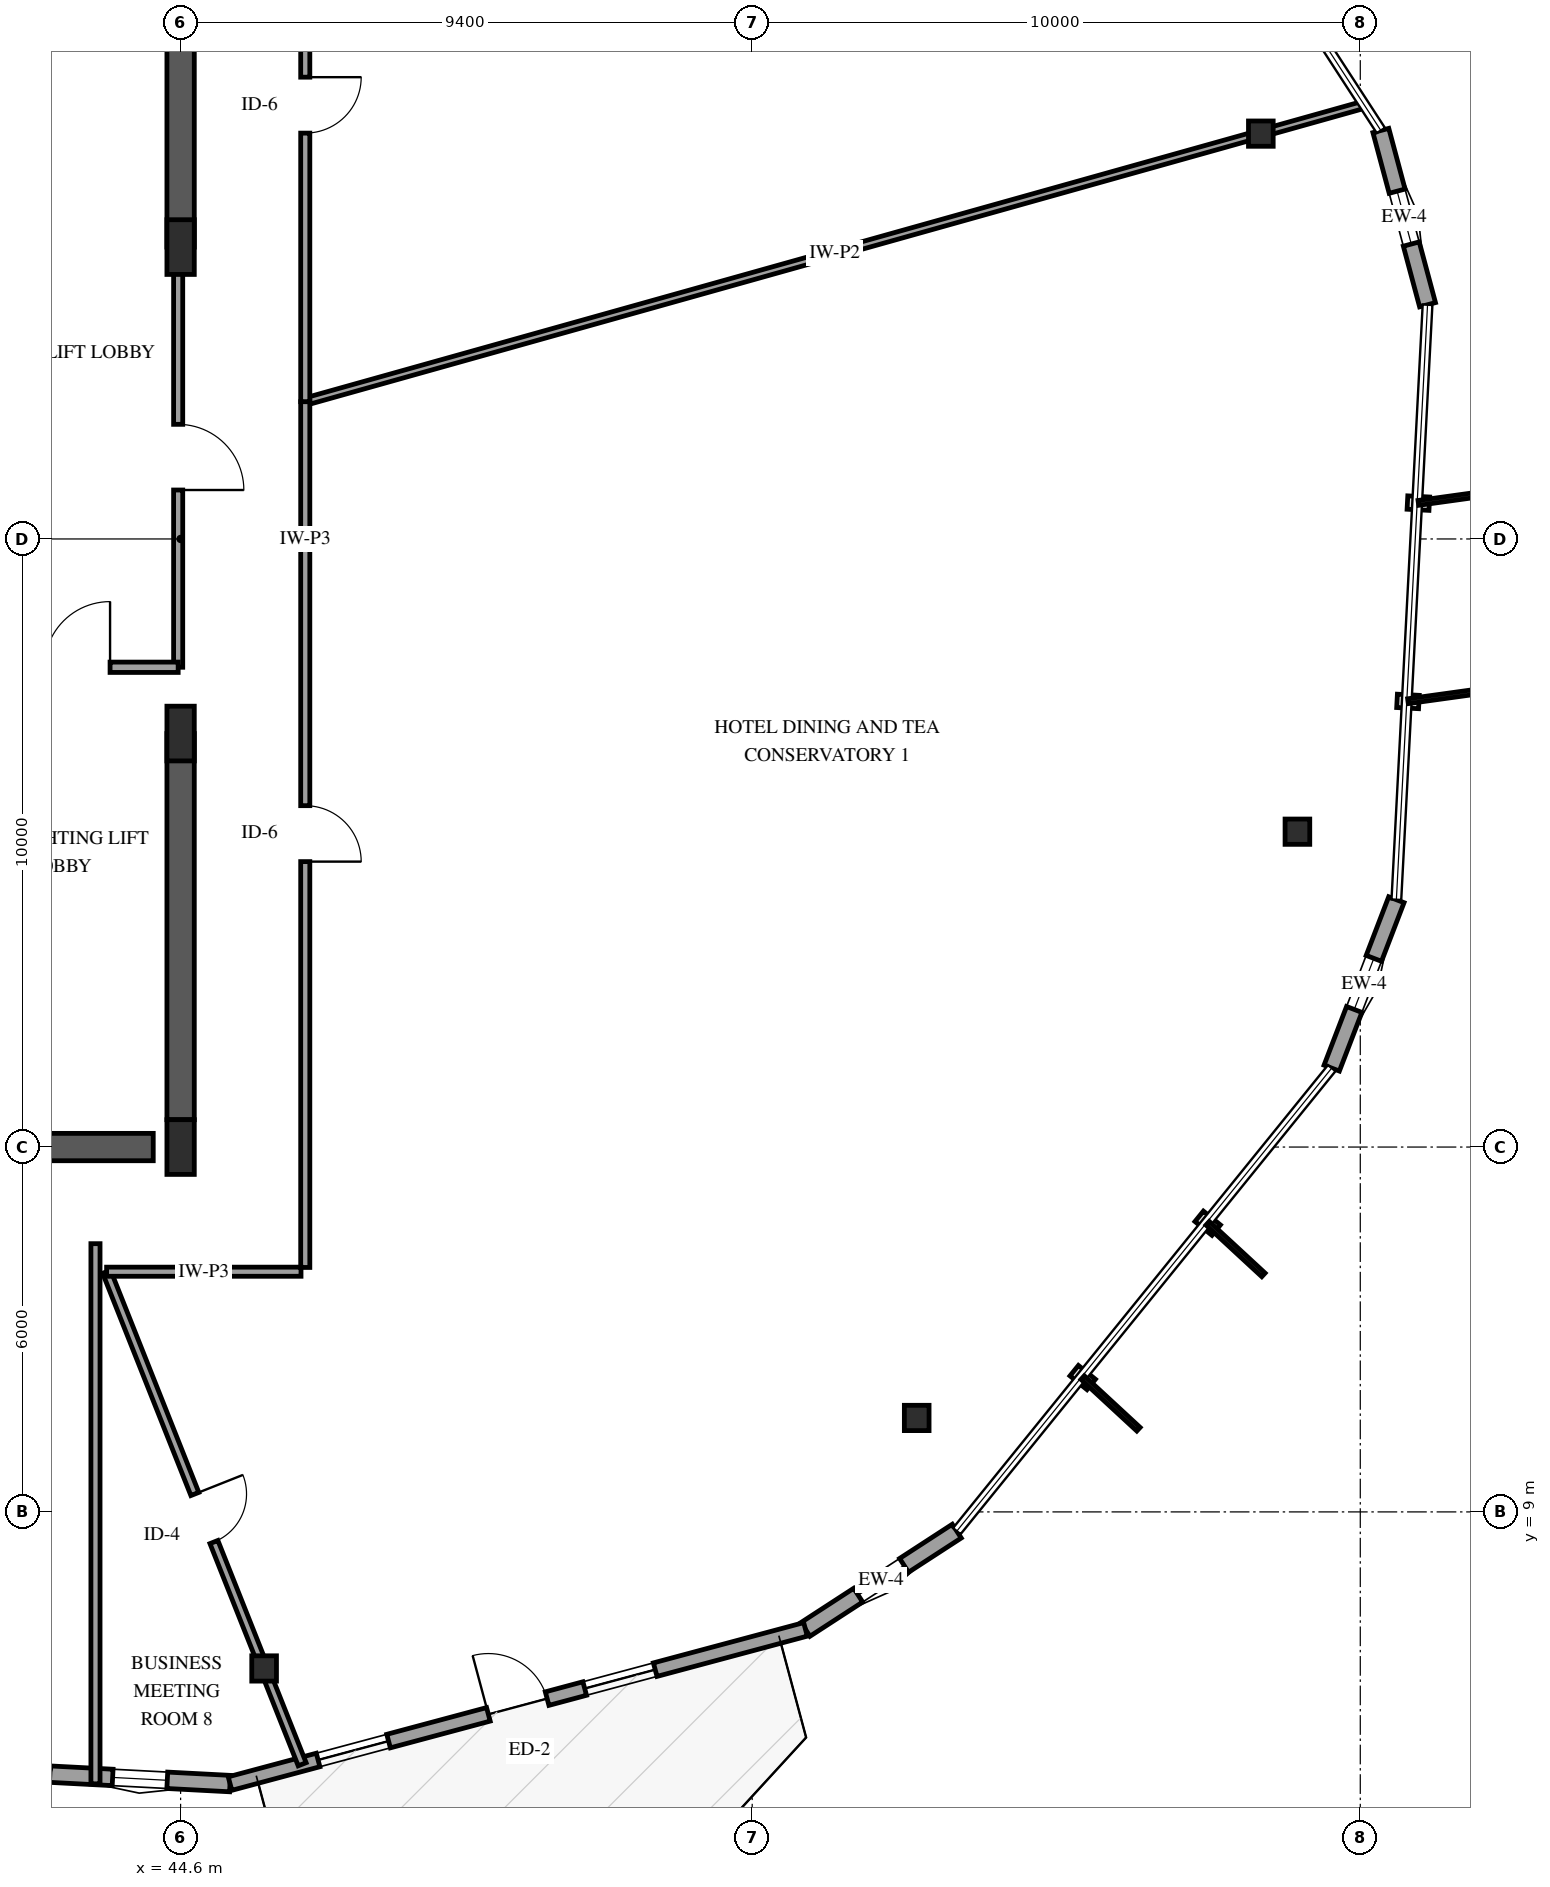
"""IFC4 building model, lengths in metres.
Left out: names, types, materials, properties, quantities, classifications, styles, units other than length and angle.
Written with IfcOpenShell. Run it as: python <this file> out.ifc"""

import sys

from ifc_helpers import new_model, si_unit, direction, frame, frame_2d, origin, origin_2d, place, context, subcontext, project, spatial, rectangle, i_section, extrude, element, fill, save


model = new_model("IFC4")
c1 = context("Model", 3, precision=1e-05, world=origin(), true_north=direction((0.0, 1.0)))
c2 = subcontext(c1, "Body", "Model", "MODEL_VIEW")
j1 = project(units=[si_unit("LENGTHUNIT", "METRE"), si_unit("PLANEANGLEUNIT", "RADIAN")], contexts=[c1])
p1 = place(None, origin())
s1 = spatial("IfcSite", under=j1, at=p1, CompositionType="ELEMENT")
p2 = place(p1, origin())
s2 = spatial("IfcBuilding", under=s1, at=p2, CompositionType="ELEMENT")
p3 = place(p2, frame((0.0, 0.0, 219.4)))
s3 = spatial("IfcBuildingStorey", under=s2, at=p3, CompositionType="ELEMENT", Elevation=219.4)
p4 = place(p3, frame((41.3, 15.0, 0.0), z_axis=(0.0, 0.0, 1.0), x_axis=(1.0, 0.0, 0.0)))
e1 = element("IfcWall", 1, at=p4, inside=s3, PredefinedType="SHEAR", context=c2, shape_type="SweptSolid", body=[
    extrude(rectangle(XDim=2.85, YDim=0.45, at=frame_2d((1.425, 0.0))), origin(), (0.0, 0.0, 1.0), 3.6),
])
p5 = place(p3, frame((44.6, 15.45, 0.0), z_axis=(0.0, 0.0, 1.0), x_axis=(0.0, 1.0, 0.0)))
e2 = element("IfcWall", 2, at=p5, inside=s3, PredefinedType="SHEAR", context=c2, shape_type="SweptSolid", body=[
    extrude(rectangle(XDim=6.35, YDim=0.45, at=frame_2d((3.175, 0.0))), origin(), (0.0, 0.0, 1.0), 3.6),
])
p6 = place(p3, frame((44.6, 29.8, 0.0), z_axis=(0.0, 0.0, 1.0), x_axis=(0.0, 1.0, 0.0)))
e3 = element("IfcWall", 3, at=p6, inside=s3, PredefinedType="SHEAR", context=c2, shape_type="SweptSolid", body=[
    extrude(rectangle(XDim=4.75, YDim=0.45, at=frame_2d((2.375, 0.0))), origin(), (0.0, 0.0, 1.0), 3.6),
])
for number, where, z_axis, x_axis in (
    (4, (44.6, 15.0, 0.0), (0.0, 0.0, 1.0), (1.0, 0.0, 0.0)),
    (5, (44.6, 21.8, 0.0), (0.0, 0.0, 1.0), (1.0, 0.0, 0.0)),
    (6, (44.6, 29.8, 0.0), (0.0, 0.0, 1.0), (1.0, 0.0, 0.0)),
):
    element("IfcColumn", number, at=place(p3, frame(where, z_axis=z_axis, x_axis=x_axis)), inside=s3, PredefinedType="PILASTER", context=c2, shape_type="SweptSolid", body=[
        extrude(rectangle(XDim=0.45, YDim=0.9, at=origin_2d()), origin(), (0.0, 0.0, 1.0), 3.6),
    ])
for number, where, z_axis, x_axis in (
    (7, (62.365, 31.666, 0.0), (0.0, 0.0, 1.0), (1.0, 0.0, 0.0)),
    (8, (45.973, 6.426, 0.0), (0.0, 0.0, 1.0), (1.0, 0.0, 0.0)),
    (9, (56.705, 10.545, 0.0), (0.0, 0.0, 1.0), (1.0, 0.0, 0.0)),
    (10, (62.966, 20.186, 0.0), (0.0, 0.0, 1.0), (1.0, 0.0, 0.0)),
):
    element("IfcColumn", number, at=place(p3, frame(where, z_axis=z_axis, x_axis=x_axis)), inside=s3, PredefinedType="COLUMN", context=c2, shape_type="SweptSolid", body=[
        extrude(i_section(OverallWidth=0.406, OverallDepth=0.416, WebThickness=0.03, FlangeThickness=0.048, FilletRadius=0.038, at=origin_2d()), origin(), (0.0, 0.0, 1.0), 3.6),
    ])
p7 = place(p3, frame((42.45, 4.688, 0.0), z_axis=(0.0, 0.0, 1.0), x_axis=(0.998629173391, -0.05234285102, 0.0)))
e11 = element("IfcWall", 11, at=p7, inside=s3, PredefinedType="SOLIDWALL", context=c2, shape_type="SweptSolid", body=[
    extrude(rectangle(XDim=2.967, YDim=0.27, at=frame_2d((1.483, 0.0))), origin(), (0.0, 0.0, 1.0), 2.679),
])
p8 = place(p7, frame((1.033, 0.0, 0.75)))
e12 = element("IfcOpeningElement", 12, at=p8, cuts=e11, PredefinedType="OPENING", context=c2, shape_type="SweptSolid", body=[
    extrude(rectangle(XDim=0.9, YDim=1.5, at=frame_2d((0.45, 0.75))), frame((0.0, 0.145, 0.0), z_axis=(0.0, -1.0, 0.0), x_axis=(1.0, 0.0, 0.0)), (0.0, 0.0, 1.0), 0.29),
])
p9 = place(p3, frame((54.876, 7.068, 0.0), z_axis=(0.0, 0.0, 1.0), x_axis=(0.838674807451, 0.544632506693, 0.0)))
e13 = element("IfcWall", 13, at=p9, inside=s3, PredefinedType="SOLIDWALL", context=c2, shape_type="SweptSolid", body=[
    extrude(rectangle(XDim=2.967, YDim=0.27, at=frame_2d((1.483, 0.0))), origin(), (0.0, 0.0, 1.0), 2.679),
])
p10 = place(p9, frame((1.033, 0.0, 0.75)))
e14 = element("IfcOpeningElement", 14, at=p10, cuts=e13, PredefinedType="OPENING", context=c2, shape_type="SweptSolid", body=[
    extrude(rectangle(XDim=0.9, YDim=1.5, at=frame_2d((0.45, 0.75))), frame((0.0, 0.145, 0.0), z_axis=(0.0, -1.0, 0.0), x_axis=(1.0, 0.0, 0.0)), (0.0, 0.0, 1.0), 0.29),
])
p11 = place(p3, frame((45.413, 4.532, 0.0), z_axis=(0.0, 0.0, 1.0), x_axis=(0.965924471327, 0.258824101839, 0.0)))
e15 = element("IfcWall", 15, at=p11, inside=s3, PredefinedType="SOLIDWALL", context=c2, shape_type="SweptSolid", body=[
    extrude(rectangle(XDim=9.798, YDim=0.23, at=frame_2d((4.899, 0.0))), origin(), (0.0, 0.0, 1.0), 2.679),
])
p12 = place(p11, frame((4.399, 0.0, 0.0)))
e16 = element("IfcOpeningElement", 16, at=p12, cuts=e15, PredefinedType="OPENING", context=c2, shape_type="SweptSolid", body=[
    extrude(rectangle(XDim=1.0, YDim=2.15, at=frame_2d((0.5, 1.075))), frame((0.0, 0.125, 0.0), z_axis=(0.0, -1.0, 0.0), x_axis=(1.0, 0.0, 0.0)), (0.0, 0.0, 1.0), 0.25),
])
p13 = place(p11, frame((1.5, 0.0, 0.72)))
e17 = element("IfcOpeningElement", 17, at=p13, cuts=e15, PredefinedType="OPENING", context=c2, shape_type="SweptSolid", body=[
    extrude(rectangle(XDim=1.2, YDim=1.6, at=frame_2d((0.6, 0.8))), frame((0.0, 0.125, 0.0), z_axis=(0.0, -1.0, 0.0), x_axis=(1.0, 0.0, 0.0)), (0.0, 0.0, 1.0), 0.25),
])
p14 = place(p11, frame((6.039, 0.0, 0.72)))
e18 = element("IfcOpeningElement", 18, at=p14, cuts=e15, PredefinedType="OPENING", context=c2, shape_type="SweptSolid", body=[
    extrude(rectangle(XDim=1.2, YDim=1.6, at=frame_2d((0.6, 0.8))), frame((0.0, 0.125, 0.0), z_axis=(0.0, -1.0, 0.0), x_axis=(1.0, 0.0, 0.0)), (0.0, 0.0, 1.0), 0.25),
])
p15 = place(p3, frame((63.53, 16.298, 0.0), z_axis=(0.0, 0.0, 1.0), x_axis=(0.358399967348, 0.933568135384, 0.0)))
e19 = element("IfcWall", 19, at=p15, inside=s3, PredefinedType="SOLIDWALL", context=c2, shape_type="SweptSolid", body=[
    extrude(rectangle(XDim=2.967, YDim=0.27, at=frame_2d((1.483, 0.0))), origin(), (0.0, 0.0, 1.0), 2.679),
])
p16 = place(p15, frame((1.033, 0.0, 0.75)))
e20 = element("IfcOpeningElement", 20, at=p16, cuts=e19, PredefinedType="OPENING", context=c2, shape_type="SweptSolid", body=[
    extrude(rectangle(XDim=0.9, YDim=1.5, at=frame_2d((0.45, 0.75))), frame((0.0, 0.145, 0.0), z_axis=(0.0, -1.0, 0.0), x_axis=(1.0, 0.0, 0.0)), (0.0, 0.0, 1.0), 0.29),
])
p17 = place(p3, frame((65.106, 28.852, 0.0), z_axis=(0.0, 0.0, 1.0), x_axis=(-0.258825213075, 0.965924173565, 0.0)))
e21 = element("IfcWall", 21, at=p17, inside=s3, PredefinedType="SOLIDWALL", context=c2, shape_type="SweptSolid", body=[
    extrude(rectangle(XDim=2.967, YDim=0.27, at=frame_2d((1.483, 0.0))), origin(), (0.0, 0.0, 1.0), 2.679),
])
p18 = place(p17, frame((1.033, 0.0, 0.75)))
e22 = element("IfcOpeningElement", 22, at=p18, cuts=e21, PredefinedType="OPENING", context=c2, shape_type="SweptSolid", body=[
    extrude(rectangle(XDim=0.9, YDim=1.5, at=frame_2d((0.45, 0.75))), frame((0.0, 0.145, 0.0), z_axis=(0.0, -1.0, 0.0), x_axis=(1.0, 0.0, 0.0)), (0.0, 0.0, 1.0), 0.29),
])
p19 = place(p3, frame((64.063, 32.142, 0.0), z_axis=(0.0, 0.0, 1.0), x_axis=(-0.962843769861, -0.270059021032, 0.0)))
e23 = element("IfcWall", 23, at=p19, inside=s3, PredefinedType="PARTITIONING", context=c2, shape_type="SweptSolid", body=[
    extrude(rectangle(XDim=18.085, YDim=0.12, at=frame_2d((9.042, 0.0))), origin(), (0.0, 0.0, 1.0), 3.3),
])
p20 = place(p3, frame((46.65, 27.258, 0.0), z_axis=(0.0, 0.0, 1.0), x_axis=(0.0, -1.0, 0.0)))
e24 = element("IfcWall", 24, at=p20, inside=s3, PredefinedType="PARTITIONING", context=c2, shape_type="SweptSolid", body=[
    extrude(rectangle(XDim=14.238, YDim=0.15, at=frame_2d((7.119, 0.0))), origin(), (0.0, 0.0, 1.0), 3.3),
])
p21 = place(p20, frame((6.644, 0.0, 0.0)))
e25 = element("IfcOpeningElement", 25, at=p21, cuts=e24, PredefinedType="OPENING", context=c2, shape_type="SweptSolid", body=[
    extrude(rectangle(XDim=0.92, YDim=2.12, at=frame_2d((0.46, 1.06))), frame((0.0, 0.085, 0.0), z_axis=(0.0, -1.0, 0.0), x_axis=(1.0, 0.0, 0.0)), (0.0, 0.0, 1.0), 0.17),
])
p22 = place(p3, frame((46.65, 36.98, 0.0), z_axis=(0.0, 0.0, 1.0), x_axis=(0.0, -1.0, 0.0)))
e26 = element("IfcWall", 26, at=p22, inside=s3, PredefinedType="PARTITIONING", context=c2, shape_type="SweptSolid", body=[
    extrude(rectangle(XDim=9.722, YDim=0.15, at=frame_2d((4.861, 0.0))), origin(), (0.0, 0.0, 1.0), 3.3),
])
p23 = place(p22, frame((4.386, 0.0, 0.0)))
e27 = element("IfcOpeningElement", 27, at=p23, cuts=e26, PredefinedType="OPENING", context=c2, shape_type="SweptSolid", body=[
    extrude(rectangle(XDim=0.92, YDim=2.12, at=frame_2d((0.46, 1.06))), frame((0.0, 0.085, 0.0), z_axis=(0.0, -1.0, 0.0), x_axis=(1.0, 0.0, 0.0)), (0.0, 0.0, 1.0), 0.17),
])
p24 = place(p3, frame((43.383, 12.95, 0.0), z_axis=(0.0, 0.0, 1.0), x_axis=(0.369027609924, -0.929418432738, 0.0)))
e28 = element("IfcWall", 28, at=p24, inside=s3, PredefinedType="PARTITIONING", context=c2, shape_type="SweptSolid", body=[
    extrude(rectangle(XDim=8.715, YDim=0.14, at=frame_2d((4.357, 0.0))), origin(), (0.0, 0.0, 1.0), 2.595),
])
p25 = place(p24, frame((3.933, 0.0, 0.0)))
e29 = element("IfcOpeningElement", 29, at=p25, cuts=e28, PredefinedType="OPENING", context=c2, shape_type="SweptSolid", body=[
    extrude(rectangle(XDim=0.85, YDim=2.1, at=frame_2d((0.425, 1.05))), frame((0.0, 0.08, 0.0), z_axis=(0.0, -1.0, 0.0), x_axis=(1.0, 0.0, 0.0)), (0.0, 0.0, 1.0), 0.16),
])
p26 = place(p3, frame((44.56, 29.8, 0.0), z_axis=(0.0, 0.0, 1.0), x_axis=(0.0, -1.0, 0.0)))
e30 = element("IfcWall", 30, at=p26, inside=s3, PredefinedType="PARTITIONING", context=c2, shape_type="SweptSolid", body=[
    extrude(rectangle(XDim=6.91, YDim=0.15, at=frame_2d((3.455, 0.0))), origin(), (0.0, 0.0, 1.0), 2.34),
])
p27 = place(p26, frame((2.915, 0.0, 0.0)))
e31 = element("IfcOpeningElement", 31, at=p27, cuts=e30, PredefinedType="OPENING", context=c2, shape_type="SweptSolid", body=[
    extrude(rectangle(XDim=1.08, YDim=2.15, at=frame_2d((0.54, 1.075))), frame((0.0, 0.085, 0.0), z_axis=(0.0, -1.0, 0.0), x_axis=(1.0, 0.0, 0.0)), (0.0, 0.0, 1.0), 0.17),
])
p28 = place(p3, frame((41.24, 22.89, 0.0), z_axis=(0.0, 0.0, 1.0), x_axis=(1.0, 0.0, 0.0)))
e32 = element("IfcWall", 32, at=p28, inside=s3, PredefinedType="PARTITIONING", context=c2, shape_type="SweptSolid", body=[
    extrude(rectangle(XDim=3.32, YDim=0.17, at=frame_2d((1.66, 0.0))), origin(), (0.0, 0.0, 1.0), 3.3),
])
p29 = place(p28, frame((1.12, 0.0, 0.0)))
e33 = element("IfcOpeningElement", 33, at=p29, cuts=e32, PredefinedType="OPENING", context=c2, shape_type="SweptSolid", body=[
    extrude(rectangle(XDim=1.08, YDim=2.15, at=frame_2d((0.54, 1.075))), frame((0.0, 0.095, 0.0), z_axis=(0.0, -1.0, 0.0), x_axis=(1.0, 0.0, 0.0)), (0.0, 0.0, 1.0), 0.19),
])
p30 = place(p3, frame((46.58, 12.95, 0.0), z_axis=(0.0, 0.0, 1.0), x_axis=(-1.0, 0.0, 0.0)))
e34 = element("IfcWall", 34, at=p30, inside=s3, PredefinedType="PARTITIONING", context=c2, shape_type="SweptSolid", body=[
    extrude(rectangle(XDim=3.197, YDim=0.15, at=frame_2d((1.599, 0.0))), origin(), (0.0, 0.0, 1.0), 3.3),
])
p31 = place(p3, frame((43.2, 13.411, 0.0), z_axis=(0.0, 0.0, 1.0), x_axis=(0.0, -1.0, 0.0)))
e35 = element("IfcWall", 35, at=p31, inside=s3, PredefinedType="PARTITIONING", context=c2, shape_type="SweptSolid", body=[
    extrude(rectangle(XDim=8.883, YDim=0.15, at=frame_2d((4.441, 0.0))), origin(), (0.0, 0.0, 1.0), 3.3),
])
p32 = place(p8, origin())
e36 = element("IfcWindow", 36, at=p32, inside=s3, PartitioningType="SINGLE_PANEL", PredefinedType="WINDOW", context=c2, shape_type="SweptSolid", body=[
    extrude(rectangle(XDim=0.9, YDim=1.5, at=frame_2d((0.45, 0.75))), frame((0.0, 0.03, 0.0), z_axis=(0.0, -1.0, 0.0), x_axis=(1.0, 0.0, 0.0)), (0.0, 0.0, 1.0), 0.06),
])
fill(e12, e36)
p33 = place(p10, origin())
e37 = element("IfcWindow", 37, at=p33, inside=s3, PartitioningType="SINGLE_PANEL", PredefinedType="WINDOW", context=c2, shape_type="SweptSolid", body=[
    extrude(rectangle(XDim=0.9, YDim=1.5, at=frame_2d((0.45, 0.75))), frame((0.0, 0.03, 0.0), z_axis=(0.0, -1.0, 0.0), x_axis=(1.0, 0.0, 0.0)), (0.0, 0.0, 1.0), 0.06),
])
fill(e14, e37)
p34 = place(p12, origin())
e38 = element("IfcDoor", 38, at=p34, inside=s3, OperationType="SINGLE_SWING_LEFT", PredefinedType="DOOR", context=c2, shape_type="SweptSolid", body=[
    extrude(rectangle(XDim=1.0, YDim=2.15, at=frame_2d((0.5, 1.075))), frame((0.0, 0.025, 0.0), z_axis=(0.0, -1.0, 0.0), x_axis=(1.0, 0.0, 0.0)), (0.0, 0.0, 1.0), 0.05),
])
fill(e16, e38)
p35 = place(p13, origin())
e39 = element("IfcWindow", 39, at=p35, inside=s3, PartitioningType="SINGLE_PANEL", PredefinedType="WINDOW", context=c2, shape_type="SweptSolid", body=[
    extrude(rectangle(XDim=1.2, YDim=1.6, at=frame_2d((0.6, 0.8))), frame((0.0, 0.03, 0.0), z_axis=(0.0, -1.0, 0.0), x_axis=(1.0, 0.0, 0.0)), (0.0, 0.0, 1.0), 0.06),
])
fill(e17, e39)
p36 = place(p14, origin())
e40 = element("IfcWindow", 40, at=p36, inside=s3, PartitioningType="SINGLE_PANEL", PredefinedType="WINDOW", context=c2, shape_type="SweptSolid", body=[
    extrude(rectangle(XDim=1.2, YDim=1.6, at=frame_2d((0.6, 0.8))), frame((0.0, 0.03, 0.0), z_axis=(0.0, -1.0, 0.0), x_axis=(1.0, 0.0, 0.0)), (0.0, 0.0, 1.0), 0.06),
])
fill(e18, e40)
p37 = place(p16, origin())
e41 = element("IfcWindow", 41, at=p37, inside=s3, PartitioningType="SINGLE_PANEL", PredefinedType="WINDOW", context=c2, shape_type="SweptSolid", body=[
    extrude(rectangle(XDim=0.9, YDim=1.5, at=frame_2d((0.45, 0.75))), frame((0.0, 0.03, 0.0), z_axis=(0.0, -1.0, 0.0), x_axis=(1.0, 0.0, 0.0)), (0.0, 0.0, 1.0), 0.06),
])
fill(e20, e41)
p38 = place(p18, origin())
e42 = element("IfcWindow", 42, at=p38, inside=s3, PartitioningType="SINGLE_PANEL", PredefinedType="WINDOW", context=c2, shape_type="SweptSolid", body=[
    extrude(rectangle(XDim=0.9, YDim=1.5, at=frame_2d((0.45, 0.75))), frame((0.0, 0.03, 0.0), z_axis=(0.0, -1.0, 0.0), x_axis=(1.0, 0.0, 0.0)), (0.0, 0.0, 1.0), 0.06),
])
fill(e22, e42)
p39 = place(p21, origin())
e43 = element("IfcDoor", 43, at=p39, inside=s3, OperationType="SINGLE_SWING_RIGHT", PredefinedType="DOOR", context=c2, shape_type="SweptSolid", body=[
    extrude(rectangle(XDim=0.92, YDim=2.12, at=frame_2d((0.46, 1.06))), frame((0.0, 0.025, 0.0), z_axis=(0.0, -1.0, 0.0), x_axis=(1.0, 0.0, 0.0)), (0.0, 0.0, 1.0), 0.05),
])
fill(e25, e43)
p40 = place(p23, origin())
e44 = element("IfcDoor", 44, at=p40, inside=s3, OperationType="SINGLE_SWING_LEFT", PredefinedType="DOOR", context=c2, shape_type="SweptSolid", body=[
    extrude(rectangle(XDim=0.92, YDim=2.12, at=frame_2d((0.46, 1.06))), frame((0.0, 0.025, 0.0), z_axis=(0.0, -1.0, 0.0), x_axis=(1.0, 0.0, 0.0)), (0.0, 0.0, 1.0), 0.05),
])
fill(e27, e44)
p41 = place(p25, origin())
e45 = element("IfcDoor", 45, at=p41, inside=s3, OperationType="SINGLE_SWING_LEFT", PredefinedType="DOOR", context=c2, shape_type="SweptSolid", body=[
    extrude(rectangle(XDim=0.85, YDim=2.1, at=frame_2d((0.425, 1.05))), frame((0.0, 0.025, 0.0), z_axis=(0.0, -1.0, 0.0), x_axis=(1.0, 0.0, 0.0)), (0.0, 0.0, 1.0), 0.05),
])
fill(e29, e45)
p42 = place(p27, origin())
e46 = element("IfcDoor", 46, at=p42, inside=s3, OperationType="SINGLE_SWING_RIGHT", PredefinedType="DOOR", context=c2, shape_type="SweptSolid", body=[
    extrude(rectangle(XDim=1.08, YDim=2.15, at=frame_2d((0.54, 1.075))), frame((0.0, 0.025, 0.0), z_axis=(0.0, -1.0, 0.0), x_axis=(1.0, 0.0, 0.0)), (0.0, 0.0, 1.0), 0.05),
])
fill(e31, e46)
p43 = place(p29, origin())
e47 = element("IfcDoor", 47, at=p43, inside=s3, OperationType="SINGLE_SWING_RIGHT", PredefinedType="DOOR", context=c2, shape_type="SweptSolid", body=[
    extrude(rectangle(XDim=1.08, YDim=2.15, at=frame_2d((0.54, 1.075))), frame((0.0, 0.025, 0.0), z_axis=(0.0, -1.0, 0.0), x_axis=(1.0, 0.0, 0.0)), (0.0, 0.0, 1.0), 0.05),
])
fill(e33, e47)
save(model, sys.argv[1])
